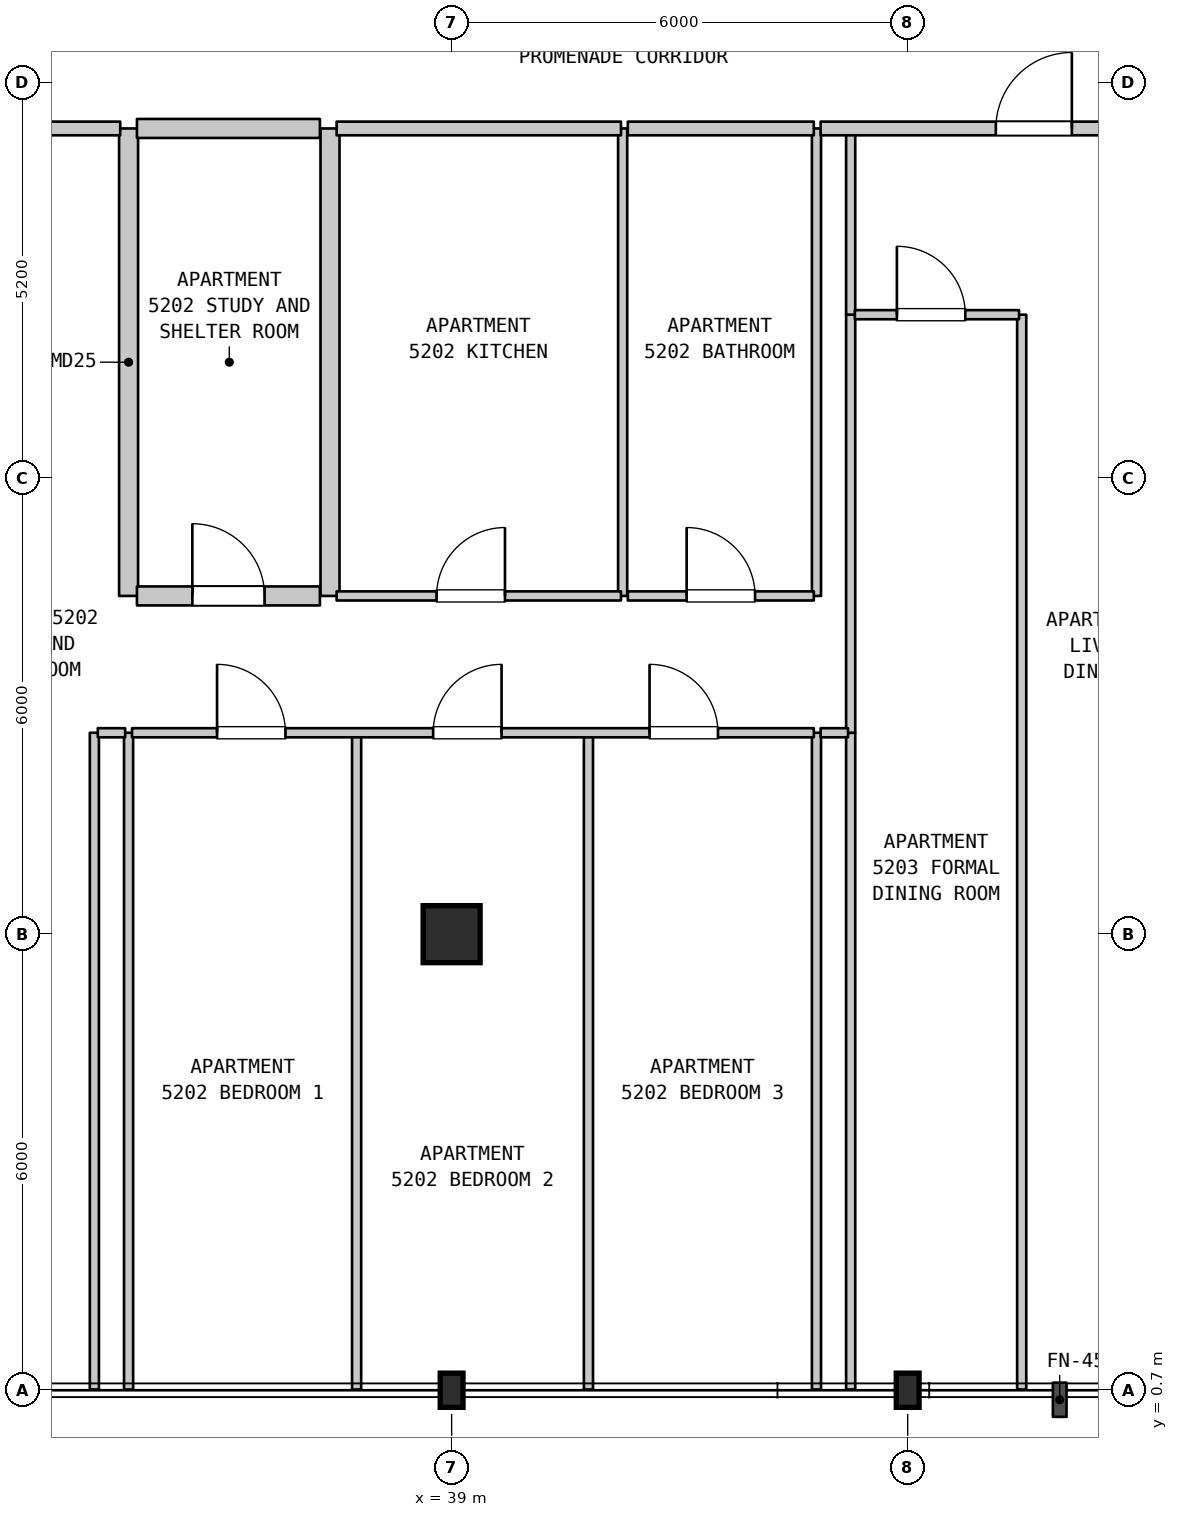
"""IFC4 building model, lengths in metres.
Left out: names, types, materials, properties, quantities, classifications, styles, units other than length and angle.
Written with IfcOpenShell. Run it as: python <this file> out.ifc"""

import sys

from ifc_helpers import new_model, si_unit, direction, frame, frame_2d, origin, origin_2d, place, context, subcontext, project, spatial, rectangle, i_section, extrude, element, fill, save


model = new_model("IFC4")
c1 = context("Model", 3, precision=1e-05, world=origin(), true_north=direction((0.0, 1.0)))
c2 = subcontext(c1, "Body", "Model", "MODEL_VIEW")
j1 = project(units=[si_unit("LENGTHUNIT", "METRE"), si_unit("PLANEANGLEUNIT", "RADIAN")], contexts=[c1])
p1 = place(None, origin())
s1 = spatial("IfcSite", under=j1, at=p1, CompositionType="ELEMENT")
p2 = place(p1, origin())
s2 = spatial("IfcBuilding", under=s1, at=p2, CompositionType="ELEMENT")
p3 = place(p2, frame((0.0, 0.0, 210.6)))
s3 = spatial("IfcBuildingStorey", under=s2, at=p3, CompositionType="ELEMENT", Elevation=210.6)
p4 = place(p3, frame((39.0, 0.7, 0.0), z_axis=(0.0, 0.0, 1.0), x_axis=(1.0, 0.0, 0.0)))
e1 = element("IfcColumn", 1, at=p4, inside=s3, PredefinedType="COLUMN", context=c2, shape_type="SweptSolid", body=[
    extrude(i_section(OverallWidth=0.3, OverallDepth=0.45, WebThickness=0.014, FlangeThickness=0.026, FilletRadius=0.027, at=origin_2d()), origin(), (0.0, 0.0, 1.0), 3.7),
])
p5 = place(p3, frame((39.0, 6.7, 0.0), z_axis=(0.0, 0.0, 1.0), x_axis=(1.0, 0.0, 0.0)))
e2 = element("IfcColumn", 2, at=p5, inside=s3, PredefinedType="COLUMN", context=c2, shape_type="SweptSolid", body=[
    extrude(rectangle(XDim=0.75, YDim=0.75, at=origin_2d()), origin(), (0.0, 0.0, 1.0), 3.7),
])
p6 = place(p3, frame((45.0, 0.7, 0.0), z_axis=(0.0, 0.0, 1.0), x_axis=(1.0, 0.0, 0.0)))
e3 = element("IfcColumn", 3, at=p6, inside=s3, PredefinedType="COLUMN", context=c2, shape_type="SweptSolid", body=[
    extrude(i_section(OverallWidth=0.3, OverallDepth=0.45, WebThickness=0.014, FlangeThickness=0.026, FilletRadius=0.027, at=origin_2d()), origin(), (0.0, 0.0, 1.0), 3.7),
])
for number, where, z_axis, x_axis in (
    (4, (34.3, 0.71, 0.0), (0.0, 0.0, 1.0), (0.0, 1.0, 0.0)),
    (5, (34.75, 0.71, 0.0), (0.0, 0.0, 1.0), (0.0, 1.0, 0.0)),
):
    element("IfcWall", number, at=place(p3, frame(where, z_axis=z_axis, x_axis=x_axis)), inside=s3, PredefinedType="PARTITIONING", context=c2, shape_type="SweptSolid", body=[
        extrude(rectangle(XDim=8.64, YDim=0.12, at=frame_2d((4.32, 0.0))), origin(), (0.0, 0.0, 1.0), 3.39),
    ])
for number, where, z_axis, x_axis in (
    (6, (34.75, 11.15, 0.0), (0.0, 0.0, 1.0), (0.0, 1.0, 0.0)),
    (7, (37.4, 11.15, 0.0), (0.0, 0.0, 1.0), (0.0, 1.0, 0.0)),
):
    element("IfcWall", number, at=place(p3, frame(where, z_axis=z_axis, x_axis=x_axis)), inside=s3, PredefinedType="STANDARD", context=c2, shape_type="SweptSolid", body=[
        extrude(rectangle(XDim=6.15, YDim=0.25, at=frame_2d((3.075, 0.0))), origin(), (0.0, 0.0, 1.0), 3.39),
    ])
for number, where, z_axis, x_axis in (
    (8, (37.75, 0.71, 0.0), (0.0, 0.0, 1.0), (0.0, 1.0, 0.0)),
    (9, (40.8, 0.71, 0.0), (0.0, 0.0, 1.0), (0.0, 1.0, 0.0)),
):
    element("IfcWall", number, at=place(p3, frame(where, z_axis=z_axis, x_axis=x_axis)), inside=s3, PredefinedType="PARTITIONING", context=c2, shape_type="SweptSolid", body=[
        extrude(rectangle(XDim=8.64, YDim=0.12, at=frame_2d((4.32, 0.0))), origin(), (0.0, 0.0, 1.0), 3.39),
    ])
p7 = place(p3, frame((41.25, 11.15, 0.0), z_axis=(0.0, 0.0, 1.0), x_axis=(0.0, 1.0, 0.0)))
e10 = element("IfcWall", 10, at=p7, inside=s3, PredefinedType="PARTITIONING", context=c2, shape_type="SweptSolid", body=[
    extrude(rectangle(XDim=6.15, YDim=0.12, at=frame_2d((3.075, 0.0))), origin(), (0.0, 0.0, 1.0), 3.39),
])
p8 = place(p3, frame((43.8, 0.71, 0.0), z_axis=(0.0, 0.0, 1.0), x_axis=(0.0, 1.0, 0.0)))
e11 = element("IfcWall", 11, at=p8, inside=s3, PredefinedType="PARTITIONING", context=c2, shape_type="SweptSolid", body=[
    extrude(rectangle(XDim=8.64, YDim=0.12, at=frame_2d((4.32, 0.0))), origin(), (0.0, 0.0, 1.0), 3.39),
])
p9 = place(p3, frame((43.8, 11.15, 0.0), z_axis=(0.0, 0.0, 1.0), x_axis=(0.0, 1.0, 0.0)))
e12 = element("IfcWall", 12, at=p9, inside=s3, PredefinedType="PARTITIONING", context=c2, shape_type="SweptSolid", body=[
    extrude(rectangle(XDim=6.15, YDim=0.12, at=frame_2d((3.075, 0.0))), origin(), (0.0, 0.0, 1.0), 3.39),
])
p10 = place(p3, frame((44.25, 0.71, 0.0), z_axis=(0.0, 0.0, 1.0), x_axis=(0.0, 1.0, 0.0)))
e13 = element("IfcWall", 13, at=p10, inside=s3, PredefinedType="PARTITIONING", context=c2, shape_type="SweptSolid", body=[
    extrude(rectangle(XDim=8.64, YDim=0.12, at=frame_2d((4.32, 0.0))), origin(), (0.0, 0.0, 1.0), 3.39),
])
p11 = place(p3, frame((44.25, 9.35, 0.0), z_axis=(0.0, 0.0, 1.0), x_axis=(0.0, 1.0, 0.0)))
e14 = element("IfcWall", 14, at=p11, inside=s3, PredefinedType="PARTITIONING", context=c2, shape_type="SweptSolid", body=[
    extrude(rectangle(XDim=5.5, YDim=0.12, at=frame_2d((2.75, 0.0))), origin(), (0.0, 0.0, 1.0), 3.39),
])
p12 = place(p3, frame((44.25, 14.85, 0.0), z_axis=(0.0, 0.0, 1.0), x_axis=(0.0, 1.0, 0.0)))
e15 = element("IfcWall", 15, at=p12, inside=s3, PredefinedType="PARTITIONING", context=c2, shape_type="SweptSolid", body=[
    extrude(rectangle(XDim=2.45, YDim=0.12, at=frame_2d((1.225, 0.0))), origin(), (0.0, 0.0, 1.0), 3.39),
])
p13 = place(p3, frame((46.5, 0.71, 0.0), z_axis=(0.0, 0.0, 1.0), x_axis=(0.0, 1.0, 0.0)))
e16 = element("IfcWall", 16, at=p13, inside=s3, PredefinedType="PARTITIONING", context=c2, shape_type="SweptSolid", body=[
    extrude(rectangle(XDim=14.14, YDim=0.12, at=frame_2d((7.07, 0.0))), origin(), (0.0, 0.0, 1.0), 3.39),
])
p14 = place(p3, frame((34.345, 9.35, 0.0), z_axis=(0.0, 0.0, 1.0), x_axis=(1.0, 0.0, 0.0)))
e17 = element("IfcWall", 17, at=p14, inside=s3, PredefinedType="PARTITIONING", context=c2, shape_type="SweptSolid", body=[
    extrude(rectangle(XDim=0.36, YDim=0.12, at=frame_2d((0.18, 0.0))), origin(), (0.0, 0.0, 1.0), 3.39),
])
p15 = place(p3, frame((34.795, 9.35, 0.0), z_axis=(0.0, 0.0, 1.0), x_axis=(1.0, 0.0, 0.0)))
e18 = element("IfcWall", 18, at=p15, inside=s3, PredefinedType="PARTITIONING", context=c2, shape_type="SweptSolid", body=[
    extrude(rectangle(XDim=8.97, YDim=0.12, at=frame_2d((4.485, 0.0))), origin(), (0.0, 0.0, 1.0), 3.39),
])
p16 = place(p15, frame((1.119, 0.0, 0.0)))
e19 = element("IfcOpeningElement", 19, at=p16, cuts=e18, PredefinedType="OPENING", context=c2, shape_type="SweptSolid", body=[
    extrude(rectangle(XDim=0.9, YDim=2.15, at=frame_2d((0.45, 1.075))), frame((0.0, 0.07, 0.0), z_axis=(0.0, -1.0, 0.0), x_axis=(1.0, 0.0, 0.0)), (0.0, 0.0, 1.0), 0.14),
])
p17 = place(p15, frame((3.962, 0.0, 0.0)))
e20 = element("IfcOpeningElement", 20, at=p17, cuts=e18, PredefinedType="OPENING", context=c2, shape_type="SweptSolid", body=[
    extrude(rectangle(XDim=0.9, YDim=2.15, at=frame_2d((0.45, 1.075))), frame((0.0, 0.07, 0.0), z_axis=(0.0, -1.0, 0.0), x_axis=(1.0, 0.0, 0.0)), (0.0, 0.0, 1.0), 0.14),
])
p18 = place(p15, frame((6.809, 0.0, 0.0)))
e21 = element("IfcOpeningElement", 21, at=p18, cuts=e18, PredefinedType="OPENING", context=c2, shape_type="SweptSolid", body=[
    extrude(rectangle(XDim=0.9, YDim=2.15, at=frame_2d((0.45, 1.075))), frame((0.0, 0.07, 0.0), z_axis=(0.0, -1.0, 0.0), x_axis=(1.0, 0.0, 0.0)), (0.0, 0.0, 1.0), 0.14),
])
p19 = place(p3, frame((43.855, 9.35, 0.0), z_axis=(0.0, 0.0, 1.0), x_axis=(1.0, 0.0, 0.0)))
e22 = element("IfcWall", 22, at=p19, inside=s3, PredefinedType="PARTITIONING", context=c2, shape_type="SweptSolid", body=[
    extrude(rectangle(XDim=0.36, YDim=0.12, at=frame_2d((0.18, 0.0))), origin(), (0.0, 0.0, 1.0), 3.39),
])
p20 = place(p3, frame((34.86, 11.15, 0.0), z_axis=(0.0, 0.0, 1.0), x_axis=(1.0, 0.0, 0.0)))
e23 = element("IfcWall", 23, at=p20, inside=s3, PredefinedType="STANDARD", context=c2, shape_type="SweptSolid", body=[
    extrude(rectangle(XDim=2.407, YDim=0.25, at=frame_2d((1.204, 0.0))), origin(), (0.0, 0.0, 1.0), 3.39),
])
p21 = place(p20, frame((0.729, 0.0, 0.0)))
e24 = element("IfcOpeningElement", 24, at=p21, cuts=e23, PredefinedType="OPENING", context=c2, shape_type="SweptSolid", body=[
    extrude(rectangle(XDim=0.95, YDim=2.15, at=frame_2d((0.475, 1.075))), frame((0.0, 0.135, 0.0), z_axis=(0.0, -1.0, 0.0), x_axis=(1.0, 0.0, 0.0)), (0.0, 0.0, 1.0), 0.27),
])
p22 = place(p3, frame((37.487, 11.15, 0.0), z_axis=(0.0, 0.0, 1.0), x_axis=(1.0, 0.0, 0.0)))
e25 = element("IfcWall", 25, at=p22, inside=s3, PredefinedType="PARTITIONING", context=c2, shape_type="SweptSolid", body=[
    extrude(rectangle(XDim=3.741, YDim=0.12, at=frame_2d((1.871, 0.0))), origin(), (0.0, 0.0, 1.0), 3.39),
])
p23 = place(p22, frame((1.315, 0.0, 0.0)))
e26 = element("IfcOpeningElement", 26, at=p23, cuts=e25, PredefinedType="OPENING", context=c2, shape_type="SweptSolid", body=[
    extrude(rectangle(XDim=0.9, YDim=2.15, at=frame_2d((0.45, 1.075))), frame((0.0, 0.07, 0.0), z_axis=(0.0, -1.0, 0.0), x_axis=(1.0, 0.0, 0.0)), (0.0, 0.0, 1.0), 0.14),
])
p24 = place(p3, frame((41.318, 11.15, 0.0), z_axis=(0.0, 0.0, 1.0), x_axis=(1.0, 0.0, 0.0)))
e27 = element("IfcWall", 27, at=p24, inside=s3, PredefinedType="PARTITIONING", context=c2, shape_type="SweptSolid", body=[
    extrude(rectangle(XDim=2.447, YDim=0.12, at=frame_2d((1.223, 0.0))), origin(), (0.0, 0.0, 1.0), 3.39),
])
p25 = place(p24, frame((0.774, 0.0, 0.0)))
e28 = element("IfcOpeningElement", 28, at=p25, cuts=e27, PredefinedType="OPENING", context=c2, shape_type="SweptSolid", body=[
    extrude(rectangle(XDim=0.9, YDim=2.1, at=frame_2d((0.45, 1.05))), frame((0.0, 0.07, 0.0), z_axis=(0.0, -1.0, 0.0), x_axis=(1.0, 0.0, 0.0)), (0.0, 0.0, 1.0), 0.14),
])
p26 = place(p3, frame((44.305, 14.85, 0.0), z_axis=(0.0, 0.0, 1.0), x_axis=(1.0, 0.0, 0.0)))
e29 = element("IfcWall", 29, at=p26, inside=s3, PredefinedType="PARTITIONING", context=c2, shape_type="SweptSolid", body=[
    extrude(rectangle(XDim=2.16, YDim=0.12, at=frame_2d((1.08, 0.0))), origin(), (0.0, 0.0, 1.0), 3.39),
])
p27 = place(p26, frame((0.553, 0.0, 0.0)))
e30 = element("IfcOpeningElement", 30, at=p27, cuts=e29, PredefinedType="OPENING", context=c2, shape_type="SweptSolid", body=[
    extrude(rectangle(XDim=0.9, YDim=2.15, at=frame_2d((0.45, 1.075))), frame((0.0, 0.07, 0.0), z_axis=(0.0, -1.0, 0.0), x_axis=(1.0, 0.0, 0.0)), (0.0, 0.0, 1.0), 0.14),
])
p28 = place(p3, frame((29.545, 17.3, 0.0), z_axis=(0.0, 0.0, 1.0), x_axis=(1.0, 0.0, 0.0)))
e31 = element("IfcWall", 31, at=p28, inside=s3, PredefinedType="STANDARD", context=c2, shape_type="SweptSolid", body=[
    extrude(rectangle(XDim=5.095, YDim=0.18, at=frame_2d((2.547, 0.0))), origin(), (0.0, 0.0, 1.0), 3.39),
])
p29 = place(p28, frame((1.792, 0.0, 0.0)))
e32 = element("IfcOpeningElement", 32, at=p29, cuts=e31, PredefinedType="OPENING", context=c2, shape_type="SweptSolid", body=[
    extrude(rectangle(XDim=1.0, YDim=2.15, at=frame_2d((0.5, 1.075))), frame((0.0, 0.1, 0.0), z_axis=(0.0, -1.0, 0.0), x_axis=(1.0, 0.0, 0.0)), (0.0, 0.0, 1.0), 0.2),
])
p30 = place(p3, frame((34.86, 17.3, 0.0), z_axis=(0.0, 0.0, 1.0), x_axis=(1.0, 0.0, 0.0)))
e33 = element("IfcWall", 33, at=p30, inside=s3, PredefinedType="STANDARD", context=c2, shape_type="SweptSolid", body=[
    extrude(rectangle(XDim=2.407, YDim=0.25, at=frame_2d((1.204, 0.0))), origin(), (0.0, 0.0, 1.0), 3.39),
])
p31 = place(p3, frame((37.487, 17.3, 0.0), z_axis=(0.0, 0.0, 1.0), x_axis=(1.0, 0.0, 0.0)))
e34 = element("IfcWall", 34, at=p31, inside=s3, PredefinedType="STANDARD", context=c2, shape_type="SweptSolid", body=[
    extrude(rectangle(XDim=3.741, YDim=0.18, at=frame_2d((1.871, 0.0))), origin(), (0.0, 0.0, 1.0), 3.39),
])
p32 = place(p3, frame((41.318, 17.3, 0.0), z_axis=(0.0, 0.0, 1.0), x_axis=(1.0, 0.0, 0.0)))
e35 = element("IfcWall", 35, at=p32, inside=s3, PredefinedType="STANDARD", context=c2, shape_type="SweptSolid", body=[
    extrude(rectangle(XDim=2.447, YDim=0.18, at=frame_2d((1.223, 0.0))), origin(), (0.0, 0.0, 1.0), 3.39),
])
p33 = place(p3, frame((43.855, 17.3, 0.0), z_axis=(0.0, 0.0, 1.0), x_axis=(1.0, 0.0, 0.0)))
e36 = element("IfcWall", 36, at=p33, inside=s3, PredefinedType="STANDARD", context=c2, shape_type="SweptSolid", body=[
    extrude(rectangle(XDim=5.21, YDim=0.18, at=frame_2d((2.605, 0.0))), origin(), (0.0, 0.0, 1.0), 3.39),
])
p34 = place(p33, frame((2.305, 0.0, 0.0)))
e37 = element("IfcOpeningElement", 37, at=p34, cuts=e36, PredefinedType="OPENING", context=c2, shape_type="SweptSolid", body=[
    extrude(rectangle(XDim=1.0, YDim=2.15, at=frame_2d((0.5, 1.075))), frame((0.0, 0.1, 0.0), z_axis=(0.0, -1.0, 0.0), x_axis=(1.0, 0.0, 0.0)), (0.0, 0.0, 1.0), 0.2),
])
p35 = place(p16, origin())
e38 = element("IfcDoor", 38, at=p35, inside=s3, OperationType="SINGLE_SWING_LEFT", PredefinedType="DOOR", context=c2, shape_type="SweptSolid", body=[
    extrude(rectangle(XDim=0.9, YDim=2.15, at=frame_2d((0.45, 1.075))), frame((0.0, 0.025, 0.0), z_axis=(0.0, -1.0, 0.0), x_axis=(1.0, 0.0, 0.0)), (0.0, 0.0, 1.0), 0.05),
])
fill(e19, e38)
p36 = place(p17, origin())
e39 = element("IfcDoor", 39, at=p36, inside=s3, OperationType="SINGLE_SWING_RIGHT", PredefinedType="DOOR", context=c2, shape_type="SweptSolid", body=[
    extrude(rectangle(XDim=0.9, YDim=2.15, at=frame_2d((0.45, 1.075))), frame((0.0, 0.025, 0.0), z_axis=(0.0, -1.0, 0.0), x_axis=(1.0, 0.0, 0.0)), (0.0, 0.0, 1.0), 0.05),
])
fill(e20, e39)
p37 = place(p18, origin())
e40 = element("IfcDoor", 40, at=p37, inside=s3, OperationType="SINGLE_SWING_LEFT", PredefinedType="DOOR", context=c2, shape_type="SweptSolid", body=[
    extrude(rectangle(XDim=0.9, YDim=2.15, at=frame_2d((0.45, 1.075))), frame((0.0, 0.025, 0.0), z_axis=(0.0, -1.0, 0.0), x_axis=(1.0, 0.0, 0.0)), (0.0, 0.0, 1.0), 0.05),
])
fill(e21, e40)
p38 = place(p21, origin())
e41 = element("IfcDoor", 41, at=p38, inside=s3, OperationType="SINGLE_SWING_LEFT", PredefinedType="DOOR", context=c2, shape_type="SweptSolid", body=[
    extrude(rectangle(XDim=0.95, YDim=2.15, at=frame_2d((0.475, 1.075))), frame((0.0, 0.025, 0.0), z_axis=(0.0, -1.0, 0.0), x_axis=(1.0, 0.0, 0.0)), (0.0, 0.0, 1.0), 0.05),
])
fill(e24, e41)
p39 = place(p23, origin())
e42 = element("IfcDoor", 42, at=p39, inside=s3, OperationType="SINGLE_SWING_RIGHT", PredefinedType="DOOR", context=c2, shape_type="SweptSolid", body=[
    extrude(rectangle(XDim=0.9, YDim=2.15, at=frame_2d((0.45, 1.075))), frame((0.0, 0.025, 0.0), z_axis=(0.0, -1.0, 0.0), x_axis=(1.0, 0.0, 0.0)), (0.0, 0.0, 1.0), 0.05),
])
fill(e26, e42)
p40 = place(p25, origin())
e43 = element("IfcDoor", 43, at=p40, inside=s3, OperationType="SINGLE_SWING_LEFT", PredefinedType="DOOR", context=c2, shape_type="SweptSolid", body=[
    extrude(rectangle(XDim=0.9, YDim=2.1, at=frame_2d((0.45, 1.05))), frame((0.0, 0.025, 0.0), z_axis=(0.0, -1.0, 0.0), x_axis=(1.0, 0.0, 0.0)), (0.0, 0.0, 1.0), 0.05),
])
fill(e28, e43)
p41 = place(p27, origin())
e44 = element("IfcDoor", 44, at=p41, inside=s3, OperationType="SINGLE_SWING_LEFT", PredefinedType="DOOR", context=c2, shape_type="SweptSolid", body=[
    extrude(rectangle(XDim=0.9, YDim=2.15, at=frame_2d((0.45, 1.075))), frame((0.0, 0.025, 0.0), z_axis=(0.0, -1.0, 0.0), x_axis=(1.0, 0.0, 0.0)), (0.0, 0.0, 1.0), 0.05),
])
fill(e30, e44)
p42 = place(p34, origin())
e45 = element("IfcDoor", 45, at=p42, inside=s3, OperationType="SINGLE_SWING_RIGHT", PredefinedType="DOOR", context=c2, shape_type="SweptSolid", body=[
    extrude(rectangle(XDim=1.0, YDim=2.15, at=frame_2d((0.5, 1.075))), frame((0.0, 0.025, 0.0), z_axis=(0.0, -1.0, 0.0), x_axis=(1.0, 0.0, 0.0)), (0.0, 0.0, 1.0), 0.05),
])
fill(e37, e45)
save(model, sys.argv[1])
